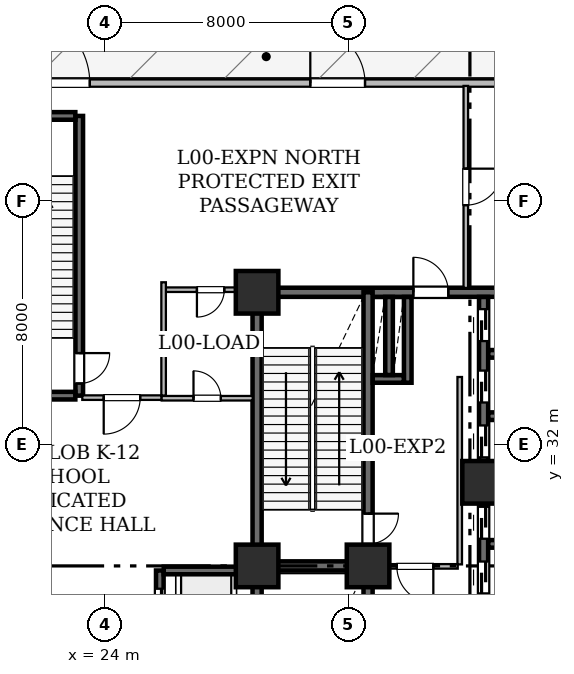
"""IFC4 building model, lengths in metres.
Left out: names, types, materials, properties, quantities, classifications, styles, units other than length and angle.
Written with IfcOpenShell. Run it as: python <this file> out.ifc"""

import sys

from ifc_helpers import new_model, si_unit, direction, frame, frame_2d, origin, origin_2d, place, context, subcontext, project, spatial, rectangle, hollow_rectangle, extrude, element, fill, save


model = new_model("IFC4")
c1 = context("Model", 3, precision=1e-05, world=origin(), true_north=direction((0.0, 1.0)))
c2 = subcontext(c1, "Body", "Model", "MODEL_VIEW")
j1 = project(units=[si_unit("LENGTHUNIT", "METRE"), si_unit("PLANEANGLEUNIT", "RADIAN")], contexts=[c1])
p1 = place(None, origin())
s1 = spatial("IfcSite", under=j1, at=p1, CompositionType="ELEMENT")
p2 = place(p1, origin())
s2 = spatial("IfcBuilding", under=s1, at=p2, CompositionType="ELEMENT")
p3 = place(p2, origin())
s3 = spatial("IfcBuildingStorey", under=s2, at=p3, CompositionType="ELEMENT", Elevation=0.0)
for number, where, z_axis, x_axis in (
    (1, (32.65, 28.0, 0.0), (0.0, 0.0, 1.0), (1.0, 0.0, 0.0)),
    (2, (29.0, 28.0, 0.0), (0.0, 0.0, 1.0), (1.0, 0.0, 0.0)),
    (3, (29.0, 37.0, 0.0), (0.0, 0.0, 1.0), (1.0, 0.0, 0.0)),
    (4, (36.45, 30.75, 0.0), (0.0, 0.0, 1.0), (1.0, 0.0, 0.0)),
):
    element("IfcColumn", number, at=place(p3, frame(where, z_axis=z_axis, x_axis=x_axis)), inside=s3, PredefinedType="COLUMN", context=c2, shape_type="SweptSolid", body=[
        extrude(hollow_rectangle(XDim=1.4, YDim=1.4, WallThickness=0.07, at=origin_2d()), origin(), (0.0, 0.0, 1.0), 7.2),
    ])
p4 = place(p3, frame((19.097, 43.88, 0.0), z_axis=(0.0, 0.0, 1.0), x_axis=(1.0, 0.0, 0.0)))
e5 = element("IfcWall", 5, at=p4, inside=s3, PredefinedType="STANDARD", context=c2, shape_type="SweptSolid", body=[
    extrude(rectangle(XDim=19.653, YDim=0.24, at=frame_2d((9.827, 0.0))), origin(), (0.0, 0.0, 1.0), 6.78),
])
p5 = place(p4, frame((11.653, 0.0, 0.0)))
e6 = element("IfcOpeningElement", 6, at=p5, cuts=e5, PredefinedType="OPENING", context=c2, shape_type="SweptSolid", body=[
    extrude(rectangle(XDim=1.8, YDim=2.2, at=frame_2d((0.9, 1.1))), frame((0.0, 0.13, 0.0), z_axis=(0.0, -1.0, 0.0), x_axis=(1.0, 0.0, 0.0)), (0.0, 0.0, 1.0), 0.26),
])
p6 = place(p4, frame((2.0, 0.0, 0.0)))
e7 = element("IfcOpeningElement", 7, at=p6, cuts=e5, PredefinedType="OPENING", context=c2, shape_type="SweptSolid", body=[
    extrude(rectangle(XDim=2.4, YDim=2.4, at=frame_2d((1.2, 1.2))), frame((0.0, 0.13, 0.0), z_axis=(0.0, -1.0, 0.0), x_axis=(1.0, 0.0, 0.0)), (0.0, 0.0, 1.0), 0.26),
])
for number, where, z_axis, x_axis in (
    (8, (29.0, 19.0, 0.0), (0.0, 0.0, 1.0), (0.0, 1.0, 0.0)),
    (9, (29.0, 28.0, 0.0), (0.0, 0.0, 1.0), (0.0, 1.0, 0.0)),
):
    element("IfcWall", number, at=place(p3, frame(where, z_axis=z_axis, x_axis=x_axis)), inside=s3, PredefinedType="SHEAR", context=c2, shape_type="SweptSolid", body=[
        extrude(rectangle(XDim=9.0, YDim=0.3, at=frame_2d((4.5, 0.0))), origin(), (0.0, 0.0, 1.0), 6.78),
    ])
p7 = place(p3, frame((29.0, 37.0, 0.0), z_axis=(0.0, 0.0, 1.0), x_axis=(1.0, 0.0, 0.0)))
e10 = element("IfcWall", 10, at=p7, inside=s3, PredefinedType="SHEAR", context=c2, shape_type="SweptSolid", body=[
    extrude(rectangle(XDim=10.4, YDim=0.3, at=frame_2d((5.2, 0.0))), origin(), (0.0, 0.0, 1.0), 6.78),
])
p8 = place(p7, frame((5.14, 0.0, 0.0)))
e11 = element("IfcOpeningElement", 11, at=p8, cuts=e10, PredefinedType="OPENING", context=c2, shape_type="SweptSolid", body=[
    extrude(rectangle(XDim=1.15, YDim=2.2, at=frame_2d((0.575, 1.1))), frame((0.0, 0.16, 0.0), z_axis=(0.0, -1.0, 0.0), x_axis=(1.0, 0.0, 0.0)), (0.0, 0.0, 1.0), 0.32),
])
p9 = place(p3, frame((32.65, 28.0, 0.0), z_axis=(0.0, 0.0, 1.0), x_axis=(0.0, -1.0, 0.0)))
e12 = element("IfcWall", 12, at=p9, inside=s3, PredefinedType="SHEAR", context=c2, shape_type="SweptSolid", body=[
    extrude(rectangle(XDim=9.0, YDim=0.3, at=frame_2d((4.5, 0.0))), origin(), (0.0, 0.0, 1.0), 6.78),
])
p10 = place(p9, frame((7.28, 0.0, 0.0)))
e13 = element("IfcOpeningElement", 13, at=p10, cuts=e12, PredefinedType="OPENING", context=c2, shape_type="SweptSolid", body=[
    extrude(rectangle(XDim=1.0, YDim=2.15, at=frame_2d((0.5, 1.075))), frame((0.0, 0.16, 0.0), z_axis=(0.0, -1.0, 0.0), x_axis=(1.0, 0.0, 0.0)), (0.0, 0.0, 1.0), 0.32),
])
p11 = place(p3, frame((32.65, 37.0, 0.0), z_axis=(0.0, 0.0, 1.0), x_axis=(0.0, -1.0, 0.0)))
e14 = element("IfcWall", 14, at=p11, inside=s3, PredefinedType="SHEAR", context=c2, shape_type="SweptSolid", body=[
    extrude(rectangle(XDim=9.0, YDim=0.3, at=frame_2d((4.5, 0.0))), origin(), (0.0, 0.0, 1.0), 6.78),
])
p12 = place(p11, frame((7.28, 0.0, 0.0)))
e15 = element("IfcOpeningElement", 15, at=p12, cuts=e14, PredefinedType="OPENING", context=c2, shape_type="SweptSolid", body=[
    extrude(rectangle(XDim=1.0, YDim=2.15, at=frame_2d((0.5, 1.075))), frame((0.0, 0.16, 0.0), z_axis=(0.0, -1.0, 0.0), x_axis=(1.0, 0.0, 0.0)), (0.0, 0.0, 1.0), 0.32),
])
p13 = place(p3, frame((29.0, 28.0, 0.0), z_axis=(0.0, 0.0, 1.0), x_axis=(1.0, 0.0, 0.0)))
e16 = element("IfcWall", 16, at=p13, inside=s3, PredefinedType="SHEAR", context=c2, shape_type="SweptSolid", body=[
    extrude(rectangle(XDim=3.65, YDim=0.3, at=frame_2d((1.825, 0.0))), origin(), (0.0, 0.0, 1.0), 6.78),
])
p14 = place(p3, frame((36.45, 25.1, 0.0), z_axis=(0.0, 0.0, 1.0), x_axis=(0.0, 1.0, 0.0)))
e17 = element("IfcWall", 17, at=p14, inside=s3, PredefinedType="SHEAR", context=c2, shape_type="SweptSolid", body=[
    extrude(rectangle(XDim=4.95, YDim=0.3, at=frame_2d((2.475, 0.0))), origin(), (0.0, 0.0, 1.0), 6.78),
])
p15 = place(p14, frame((0.12, 0.0, 0.0)))
e18 = element("IfcOpeningElement", 18, at=p15, cuts=e17, PredefinedType="OPENING", context=c2, shape_type="SweptSolid", body=[
    extrude(rectangle(XDim=1.05, YDim=2.15, at=frame_2d((0.525, 1.075))), frame((0.0, 0.16, 0.0), z_axis=(0.0, -1.0, 0.0), x_axis=(1.0, 0.0, 0.0)), (0.0, 0.0, 1.0), 0.32),
])
p16 = place(p14, frame((1.995, 0.0, 0.0)))
e19 = element("IfcOpeningElement", 19, at=p16, cuts=e17, PredefinedType="OPENING", context=c2, shape_type="SweptSolid", body=[
    extrude(rectangle(XDim=1.05, YDim=2.15, at=frame_2d((0.525, 1.075))), frame((0.0, 0.16, 0.0), z_axis=(0.0, -1.0, 0.0), x_axis=(1.0, 0.0, 0.0)), (0.0, 0.0, 1.0), 0.32),
])
p17 = place(p14, frame((3.795, 0.0, 0.0)))
e20 = element("IfcOpeningElement", 20, at=p17, cuts=e17, PredefinedType="OPENING", context=c2, shape_type="SweptSolid", body=[
    extrude(rectangle(XDim=1.05, YDim=2.15, at=frame_2d((0.525, 1.075))), frame((0.0, 0.16, 0.0), z_axis=(0.0, -1.0, 0.0), x_axis=(1.0, 0.0, 0.0)), (0.0, 0.0, 1.0), 0.32),
])
p18 = place(p3, frame((36.45, 31.45, 0.0), z_axis=(0.0, 0.0, 1.0), x_axis=(0.0, 1.0, 0.0)))
e21 = element("IfcWall", 21, at=p18, inside=s3, PredefinedType="SHEAR", context=c2, shape_type="SweptSolid", body=[
    extrude(rectangle(XDim=5.396, YDim=0.3, at=frame_2d((2.698, 0.0))), origin(), (0.0, 0.0, 1.0), 6.78),
])
p19 = place(p18, frame((0.12, 0.0, 0.0)))
e22 = element("IfcOpeningElement", 22, at=p19, cuts=e21, PredefinedType="OPENING", context=c2, shape_type="SweptSolid", body=[
    extrude(rectangle(XDim=1.05, YDim=2.15, at=frame_2d((0.525, 1.075))), frame((0.0, 0.16, 0.0), z_axis=(0.0, -1.0, 0.0), x_axis=(1.0, 0.0, 0.0)), (0.0, 0.0, 1.0), 0.32),
])
p20 = place(p18, frame((1.925, 0.0, 0.0)))
e23 = element("IfcOpeningElement", 23, at=p20, cuts=e21, PredefinedType="OPENING", context=c2, shape_type="SweptSolid", body=[
    extrude(rectangle(XDim=1.05, YDim=2.15, at=frame_2d((0.525, 1.075))), frame((0.0, 0.16, 0.0), z_axis=(0.0, -1.0, 0.0), x_axis=(1.0, 0.0, 0.0)), (0.0, 0.0, 1.0), 0.32),
])
p21 = place(p18, frame((3.945, 0.0, 0.0)))
e24 = element("IfcOpeningElement", 24, at=p21, cuts=e21, PredefinedType="OPENING", context=c2, shape_type="SweptSolid", body=[
    extrude(rectangle(XDim=1.05, YDim=2.15, at=frame_2d((0.525, 1.075))), frame((0.0, 0.16, 0.0), z_axis=(0.0, -1.0, 0.0), x_axis=(1.0, 0.0, 0.0)), (0.0, 0.0, 1.0), 0.32),
])
for number, where, z_axis, x_axis in (
    (25, (36.604, 28.725, 0.0), (0.0, 0.0, 1.0), (1.0, 0.0, 0.0)),
    (26, (36.604, 30.725, 0.0), (0.0, 0.0, 1.0), (1.0, 0.0, 0.0)),
    (27, (36.604, 32.925, 0.0), (0.0, 0.0, 1.0), (1.0, 0.0, 0.0)),
    (28, (36.604, 34.975, 0.0), (0.0, 0.0, 1.0), (1.0, 0.0, 0.0)),
):
    element("IfcWall", number, at=place(p3, frame(where, z_axis=z_axis, x_axis=x_axis)), inside=s3, PredefinedType="SHEAR", context=c2, shape_type="SweptSolid", body=[
        extrude(rectangle(XDim=2.642, YDim=0.25, at=frame_2d((1.321, 0.0))), origin(), (0.0, 0.0, 1.0), 6.78),
    ])
p22 = place(p3, frame((33.955, 34.025, 0.0), z_axis=(0.0, 0.0, 1.0), x_axis=(0.0, 1.0, 0.0)))
e29 = element("IfcWall", 29, at=p22, inside=s3, PredefinedType="SHEAR", context=c2, shape_type="SweptSolid", body=[
    extrude(rectangle(XDim=2.821, YDim=0.25, at=frame_2d((1.411, 0.0))), origin(), (0.0, 0.0, 1.0), 6.78),
])
p23 = place(p3, frame((32.804, 34.15, 0.0), z_axis=(0.0, 0.0, 1.0), x_axis=(1.0, 0.0, 0.0)))
e30 = element("IfcWall", 30, at=p23, inside=s3, PredefinedType="SHEAR", context=c2, shape_type="SweptSolid", body=[
    extrude(rectangle(XDim=1.022, YDim=0.25, at=frame_2d((0.511, 0.0))), origin(), (0.0, 0.0, 1.0), 6.78),
])
p24 = place(p3, frame((33.34, 34.279, 0.0), z_axis=(0.0, 0.0, 1.0), x_axis=(0.0, 1.0, 0.0)))
e31 = element("IfcWall", 31, at=p24, inside=s3, PredefinedType="SHEAR", context=c2, shape_type="SweptSolid", body=[
    extrude(rectangle(XDim=2.567, YDim=0.25, at=frame_2d((1.283, 0.0))), origin(), (0.0, 0.0, 1.0), 6.78),
])
p25 = place(p3, frame((23.15, 42.8, 0.0), z_axis=(0.0, 0.0, 1.0), x_axis=(0.0, -1.0, 0.0)))
e32 = element("IfcWall", 32, at=p25, inside=s3, PredefinedType="SHEAR", context=c2, shape_type="SweptSolid", body=[
    extrude(rectangle(XDim=9.2, YDim=0.25, at=frame_2d((4.6, 0.0))), origin(), (0.0, 0.0, 1.0), 6.78),
])
p26 = place(p25, frame((7.8, 0.0, 0.0)))
e33 = element("IfcOpeningElement", 33, at=p26, cuts=e32, PredefinedType="OPENING", context=c2, shape_type="SweptSolid", body=[
    extrude(rectangle(XDim=1.0, YDim=2.15, at=frame_2d((0.5, 1.075))), frame((0.0, 0.135, 0.0), z_axis=(0.0, -1.0, 0.0), x_axis=(1.0, 0.0, 0.0)), (0.0, 0.0, 1.0), 0.27),
])
for number, where, z_axis, x_axis in (
    (34, (19.329, 33.6, 0.0), (0.0, 0.0, 1.0), (1.0, 0.0, 0.0)),
    (35, (19.329, 42.8, 0.0), (0.0, 0.0, 1.0), (1.0, 0.0, 0.0)),
):
    element("IfcWall", number, at=place(p3, frame(where, z_axis=z_axis, x_axis=x_axis)), inside=s3, PredefinedType="SHEAR", context=c2, shape_type="SweptSolid", body=[
        extrude(rectangle(XDim=3.692, YDim=0.25, at=frame_2d((1.846, 0.0))), origin(), (0.0, 0.0, 1.0), 6.78),
    ])
p27 = place(p3, frame((25.8, 23.3, 0.0), z_axis=(0.0, 0.0, 1.0), x_axis=(0.0, 1.0, 0.0)))
e36 = element("IfcWall", 36, at=p27, inside=s3, PredefinedType="SHEAR", context=c2, shape_type="SweptSolid", body=[
    extrude(rectangle(XDim=4.55, YDim=0.25, at=frame_2d((2.275, 0.0))), origin(), (0.0, 0.0, 1.0), 6.78),
])
p28 = place(p27, frame((0.6, 0.0, 0.0)))
e37 = element("IfcOpeningElement", 37, at=p28, cuts=e36, PredefinedType="OPENING", context=c2, shape_type="SweptSolid", body=[
    extrude(rectangle(XDim=1.1, YDim=2.15, at=frame_2d((0.55, 1.075))), frame((0.0, 0.135, 0.0), z_axis=(0.0, -1.0, 0.0), x_axis=(1.0, 0.0, 0.0)), (0.0, 0.0, 1.0), 0.27),
])
p29 = place(p27, frame((2.85, 0.0, 0.0)))
e38 = element("IfcOpeningElement", 38, at=p29, cuts=e36, PredefinedType="OPENING", context=c2, shape_type="SweptSolid", body=[
    extrude(rectangle(XDim=1.1, YDim=2.15, at=frame_2d((0.55, 1.075))), frame((0.0, 0.135, 0.0), z_axis=(0.0, -1.0, 0.0), x_axis=(1.0, 0.0, 0.0)), (0.0, 0.0, 1.0), 0.27),
])
p30 = place(p3, frame((25.929, 27.85, 0.0), z_axis=(0.0, 0.0, 1.0), x_axis=(1.0, 0.0, 0.0)))
e39 = element("IfcWall", 39, at=p30, inside=s3, PredefinedType="SHEAR", context=c2, shape_type="SweptSolid", body=[
    extrude(rectangle(XDim=2.917, YDim=0.25, at=frame_2d((1.458, 0.0))), origin(), (0.0, 0.0, 1.0), 6.78),
])
p31 = place(p3, frame((35.665, 34.214, 0.0), z_axis=(0.0, 0.0, 1.0), x_axis=(0.0, -1.0, 0.0)))
e40 = element("IfcWall", 40, at=p31, inside=s3, PredefinedType="STANDARD", context=c2, shape_type="SweptSolid", body=[
    extrude(rectangle(XDim=6.164, YDim=0.15, at=frame_2d((3.082, 0.0))), origin(), (0.0, 0.0, 1.0), 6.78),
])
p32 = place(p3, frame((35.6, 27.985, 0.0), z_axis=(0.0, 0.0, 1.0), x_axis=(-1.0, 0.0, 0.0)))
e41 = element("IfcWall", 41, at=p32, inside=s3, PredefinedType="STANDARD", context=c2, shape_type="SweptSolid", body=[
    extrude(rectangle(XDim=2.806, YDim=0.15, at=frame_2d((1.403, 0.0))), origin(), (0.0, 0.0, 1.0), 6.237),
])
p33 = place(p32, frame((0.803, 0.0, 0.0)))
e42 = element("IfcOpeningElement", 42, at=p33, cuts=e41, PredefinedType="OPENING", context=c2, shape_type="SweptSolid", body=[
    extrude(rectangle(XDim=1.2, YDim=2.15, at=frame_2d((0.6, 1.075))), frame((0.0, 0.085, 0.0), z_axis=(0.0, -1.0, 0.0), x_axis=(1.0, 0.0, 0.0)), (0.0, 0.0, 1.0), 0.17),
])
p34 = place(p3, frame((25.86, 33.535, 0.0), z_axis=(0.0, 0.0, 1.0), x_axis=(-1.0, 0.0, 0.0)))
e43 = element("IfcWall", 43, at=p34, inside=s3, PredefinedType="STANDARD", context=c2, shape_type="SweptSolid", body=[
    extrude(rectangle(XDim=2.61, YDim=0.15, at=frame_2d((1.305, 0.0))), origin(), (0.0, 0.0, 1.0), 6.78),
])
p35 = place(p34, frame((0.705, 0.0, 0.0)))
e44 = element("IfcOpeningElement", 44, at=p35, cuts=e43, PredefinedType="OPENING", context=c2, shape_type="SweptSolid", body=[
    extrude(rectangle(XDim=1.2, YDim=2.15, at=frame_2d((0.6, 1.075))), frame((0.0, 0.085, 0.0), z_axis=(0.0, -1.0, 0.0), x_axis=(1.0, 0.0, 0.0)), (0.0, 0.0, 1.0), 0.17),
])
p36 = place(p3, frame((35.865, 43.788, 0.0), z_axis=(0.0, 0.0, 1.0), x_axis=(0.0, -1.0, 0.0)))
e45 = element("IfcWall", 45, at=p36, inside=s3, PredefinedType="STANDARD", context=c2, shape_type="SweptSolid", body=[
    extrude(rectangle(XDim=6.644, YDim=0.15, at=frame_2d((3.322, 0.0))), origin(), (0.0, 0.0, 1.0), 5.915),
])
p37 = place(p36, frame((2.722, 0.0, 0.0)))
e46 = element("IfcOpeningElement", 46, at=p37, cuts=e45, PredefinedType="OPENING", context=c2, shape_type="SweptSolid", body=[
    extrude(rectangle(XDim=1.2, YDim=2.15, at=frame_2d((0.6, 1.075))), frame((0.0, 0.085, 0.0), z_axis=(0.0, -1.0, 0.0), x_axis=(1.0, 0.0, 0.0)), (0.0, 0.0, 1.0), 0.17),
])
p38 = place(p3, frame((28.943, 37.085, 0.0), z_axis=(0.0, 0.0, 1.0), x_axis=(-1.0, 0.0, 0.0)))
e47 = element("IfcWall", 47, at=p38, inside=s3, PredefinedType="STANDARD", context=c2, shape_type="SweptSolid", body=[
    extrude(rectangle(XDim=2.943, YDim=0.15, at=frame_2d((1.472, 0.0))), origin(), (0.0, 0.0, 1.0), 6.237),
])
p39 = place(p38, frame((1.022, 0.0, 0.0)))
e48 = element("IfcOpeningElement", 48, at=p39, cuts=e47, PredefinedType="OPENING", context=c2, shape_type="SweptSolid", body=[
    extrude(rectangle(XDim=0.9, YDim=2.1, at=frame_2d((0.45, 1.05))), frame((0.0, 0.085, 0.0), z_axis=(0.0, -1.0, 0.0), x_axis=(1.0, 0.0, 0.0)), (0.0, 0.0, 1.0), 0.17),
])
p40 = place(p3, frame((25.925, 37.329, 0.0), z_axis=(0.0, 0.0, 1.0), x_axis=(0.0, -1.0, 0.0)))
e49 = element("IfcWall", 49, at=p40, inside=s3, PredefinedType="STANDARD", context=c2, shape_type="SweptSolid", body=[
    extrude(rectangle(XDim=3.729, YDim=0.15, at=frame_2d((1.865, 0.0))), origin(), (0.0, 0.0, 1.0), 6.78),
])
p41 = place(p3, frame((25.86, 33.515, 0.0), z_axis=(0.0, 0.0, 1.0), x_axis=(1.0, 0.0, 0.0)))
e50 = element("IfcWall", 50, at=p41, inside=s3, PredefinedType="STANDARD", context=c2, shape_type="SweptSolid", body=[
    extrude(rectangle(XDim=2.996, YDim=0.15, at=frame_2d((1.498, 0.0))), origin(), (0.0, 0.0, 1.0), 6.237),
])
p42 = place(p41, frame((1.048, 0.0, 0.0)))
e51 = element("IfcOpeningElement", 51, at=p42, cuts=e50, PredefinedType="OPENING", context=c2, shape_type="SweptSolid", body=[
    extrude(rectangle(XDim=0.9, YDim=2.1, at=frame_2d((0.45, 1.05))), frame((0.0, 0.085, 0.0), z_axis=(0.0, -1.0, 0.0), x_axis=(1.0, 0.0, 0.0)), (0.0, 0.0, 1.0), 0.17),
])
p43 = place(p5, origin())
e52 = element("IfcDoor", 52, at=p43, inside=s3, OperationType="SINGLE_SWING_LEFT", PredefinedType="DOOR", context=c2, shape_type="SweptSolid", body=[
    extrude(rectangle(XDim=1.8, YDim=2.2, at=frame_2d((0.9, 1.1))), frame((0.0, 0.025, 0.0), z_axis=(0.0, -1.0, 0.0), x_axis=(1.0, 0.0, 0.0)), (0.0, 0.0, 1.0), 0.05),
])
fill(e6, e52)
p44 = place(p6, origin())
e53 = element("IfcDoor", 53, at=p44, inside=s3, OperationType="SINGLE_SWING_LEFT", PredefinedType="DOOR", context=c2, shape_type="SweptSolid", body=[
    extrude(rectangle(XDim=2.4, YDim=2.4, at=frame_2d((1.2, 1.2))), frame((0.0, 0.025, 0.0), z_axis=(0.0, -1.0, 0.0), x_axis=(1.0, 0.0, 0.0)), (0.0, 0.0, 1.0), 0.05),
])
fill(e7, e53)
p45 = place(p12, origin())
e54 = element("IfcDoor", 54, at=p45, inside=s3, OperationType="SINGLE_SWING_LEFT", PredefinedType="DOOR", context=c2, shape_type="SweptSolid", body=[
    extrude(rectangle(XDim=1.0, YDim=2.15, at=frame_2d((0.5, 1.075))), frame((0.0, 0.025, 0.0), z_axis=(0.0, -1.0, 0.0), x_axis=(1.0, 0.0, 0.0)), (0.0, 0.0, 1.0), 0.05),
])
fill(e15, e54)
p46 = place(p8, origin())
e55 = element("IfcDoor", 55, at=p46, inside=s3, OperationType="SINGLE_SWING_LEFT", PredefinedType="DOOR", context=c2, shape_type="SweptSolid", body=[
    extrude(rectangle(XDim=1.15, YDim=2.2, at=frame_2d((0.575, 1.1))), frame((0.0, 0.025, 0.0), z_axis=(0.0, -1.0, 0.0), x_axis=(1.0, 0.0, 0.0)), (0.0, 0.0, 1.0), 0.05),
])
fill(e11, e55)
p47 = place(p16, origin())
e56 = element("IfcDoor", 56, at=p47, inside=s3, OperationType="SLIDING_TO_LEFT", PredefinedType="DOOR", context=c2, shape_type="SweptSolid", body=[
    extrude(rectangle(XDim=1.05, YDim=2.15, at=frame_2d((0.525, 1.075))), frame((0.0, 0.025, 0.0), z_axis=(0.0, -1.0, 0.0), x_axis=(1.0, 0.0, 0.0)), (0.0, 0.0, 1.0), 0.05),
])
fill(e19, e56)
p48 = place(p17, origin())
e57 = element("IfcDoor", 57, at=p48, inside=s3, OperationType="SLIDING_TO_LEFT", PredefinedType="DOOR", context=c2, shape_type="SweptSolid", body=[
    extrude(rectangle(XDim=1.05, YDim=2.15, at=frame_2d((0.525, 1.075))), frame((0.0, 0.025, 0.0), z_axis=(0.0, -1.0, 0.0), x_axis=(1.0, 0.0, 0.0)), (0.0, 0.0, 1.0), 0.05),
])
fill(e20, e57)
p49 = place(p19, origin())
e58 = element("IfcDoor", 58, at=p49, inside=s3, OperationType="SLIDING_TO_LEFT", PredefinedType="DOOR", context=c2, shape_type="SweptSolid", body=[
    extrude(rectangle(XDim=1.05, YDim=2.15, at=frame_2d((0.525, 1.075))), frame((0.0, 0.025, 0.0), z_axis=(0.0, -1.0, 0.0), x_axis=(1.0, 0.0, 0.0)), (0.0, 0.0, 1.0), 0.05),
])
fill(e22, e58)
p50 = place(p20, origin())
e59 = element("IfcDoor", 59, at=p50, inside=s3, OperationType="SLIDING_TO_LEFT", PredefinedType="DOOR", context=c2, shape_type="SweptSolid", body=[
    extrude(rectangle(XDim=1.05, YDim=2.15, at=frame_2d((0.525, 1.075))), frame((0.0, 0.025, 0.0), z_axis=(0.0, -1.0, 0.0), x_axis=(1.0, 0.0, 0.0)), (0.0, 0.0, 1.0), 0.05),
])
fill(e23, e59)
p51 = place(p21, origin())
e60 = element("IfcDoor", 60, at=p51, inside=s3, OperationType="SLIDING_TO_LEFT", PredefinedType="DOOR", context=c2, shape_type="SweptSolid", body=[
    extrude(rectangle(XDim=1.05, YDim=2.15, at=frame_2d((0.525, 1.075))), frame((0.0, 0.025, 0.0), z_axis=(0.0, -1.0, 0.0), x_axis=(1.0, 0.0, 0.0)), (0.0, 0.0, 1.0), 0.05),
])
fill(e24, e60)
p52 = place(p26, origin())
e61 = element("IfcDoor", 61, at=p52, inside=s3, OperationType="SINGLE_SWING_LEFT", PredefinedType="DOOR", context=c2, shape_type="SweptSolid", body=[
    extrude(rectangle(XDim=1.0, YDim=2.15, at=frame_2d((0.5, 1.075))), frame((0.0, 0.025, 0.0), z_axis=(0.0, -1.0, 0.0), x_axis=(1.0, 0.0, 0.0)), (0.0, 0.0, 1.0), 0.05),
])
fill(e33, e61)
p53 = place(p29, origin())
e62 = element("IfcDoor", 62, at=p53, inside=s3, OperationType="SLIDING_TO_LEFT", PredefinedType="DOOR", context=c2, shape_type="SweptSolid", body=[
    extrude(rectangle(XDim=1.1, YDim=2.15, at=frame_2d((0.55, 1.075))), frame((0.0, 0.025, 0.0), z_axis=(0.0, -1.0, 0.0), x_axis=(1.0, 0.0, 0.0)), (0.0, 0.0, 1.0), 0.05),
])
fill(e38, e62)
p54 = place(p33, origin())
e63 = element("IfcDoor", 63, at=p54, inside=s3, OperationType="SINGLE_SWING_LEFT", PredefinedType="DOOR", context=c2, shape_type="SweptSolid", body=[
    extrude(rectangle(XDim=1.2, YDim=2.15, at=frame_2d((0.6, 1.075))), frame((0.0, 0.025, 0.0), z_axis=(0.0, -1.0, 0.0), x_axis=(1.0, 0.0, 0.0)), (0.0, 0.0, 1.0), 0.05),
])
fill(e42, e63)
p55 = place(p35, origin())
e64 = element("IfcDoor", 64, at=p55, inside=s3, OperationType="SINGLE_SWING_RIGHT", PredefinedType="DOOR", context=c2, shape_type="SweptSolid", body=[
    extrude(rectangle(XDim=1.2, YDim=2.15, at=frame_2d((0.6, 1.075))), frame((0.0, 0.025, 0.0), z_axis=(0.0, -1.0, 0.0), x_axis=(1.0, 0.0, 0.0)), (0.0, 0.0, 1.0), 0.05),
])
fill(e44, e64)
p56 = place(p37, origin())
e65 = element("IfcDoor", 65, at=p56, inside=s3, OperationType="SINGLE_SWING_LEFT", PredefinedType="DOOR", context=c2, shape_type="SweptSolid", body=[
    extrude(rectangle(XDim=1.2, YDim=2.15, at=frame_2d((0.6, 1.075))), frame((0.0, 0.025, 0.0), z_axis=(0.0, -1.0, 0.0), x_axis=(1.0, 0.0, 0.0)), (0.0, 0.0, 1.0), 0.05),
])
fill(e46, e65)
p57 = place(p39, origin())
e66 = element("IfcDoor", 66, at=p57, inside=s3, OperationType="SINGLE_SWING_RIGHT", PredefinedType="DOOR", context=c2, shape_type="SweptSolid", body=[
    extrude(rectangle(XDim=0.9, YDim=2.1, at=frame_2d((0.45, 1.05))), frame((0.0, 0.025, 0.0), z_axis=(0.0, -1.0, 0.0), x_axis=(1.0, 0.0, 0.0)), (0.0, 0.0, 1.0), 0.05),
])
fill(e48, e66)
p58 = place(p42, origin())
e67 = element("IfcDoor", 67, at=p58, inside=s3, OperationType="SINGLE_SWING_LEFT", PredefinedType="DOOR", context=c2, shape_type="SweptSolid", body=[
    extrude(rectangle(XDim=0.9, YDim=2.1, at=frame_2d((0.45, 1.05))), frame((0.0, 0.025, 0.0), z_axis=(0.0, -1.0, 0.0), x_axis=(1.0, 0.0, 0.0)), (0.0, 0.0, 1.0), 0.05),
])
fill(e51, e67)
save(model, sys.argv[1])
